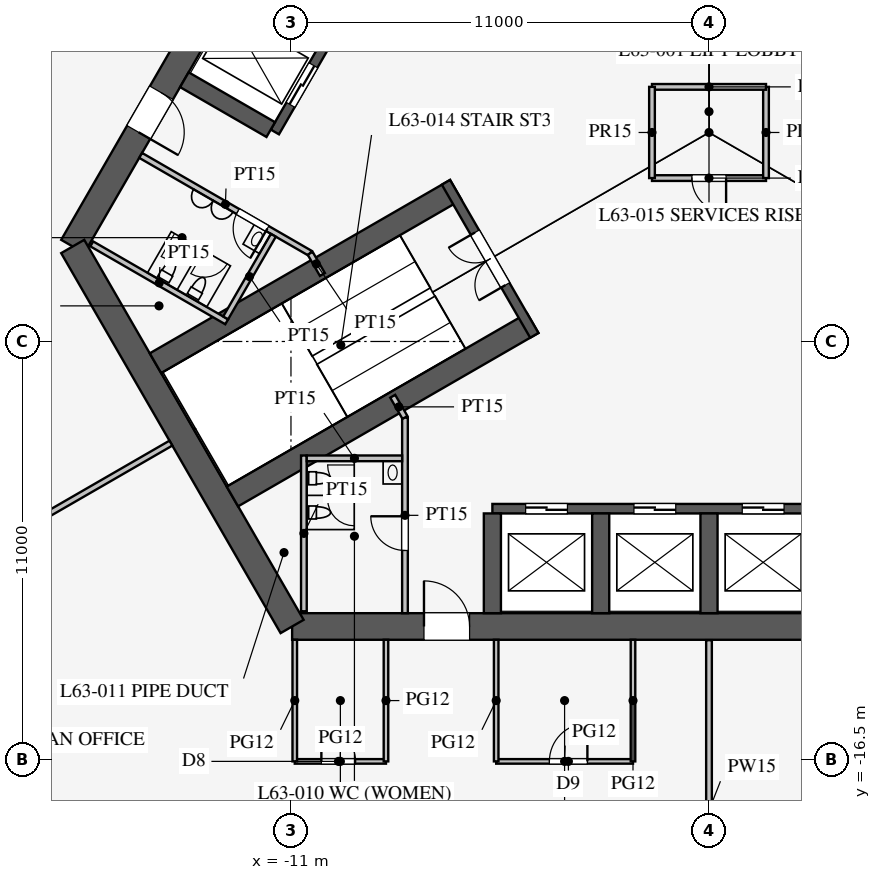
"""IFC4 building model, lengths in metres.
Left out: names, types, materials, properties, quantities, classifications, styles, units other than length and angle.
Written with IfcOpenShell. Run it as: python <this file> out.ifc"""

import sys

from ifc_helpers import new_model, si_unit, direction, frame, frame_2d, origin, place, context, subcontext, project, spatial, rectangle, extrude, element, fill, save


model = new_model("IFC4")
c1 = context("Model", 3, precision=1e-05, world=origin(), true_north=direction((0.0, 1.0)))
c2 = subcontext(c1, "Body", "Model", "MODEL_VIEW")
j1 = project(units=[si_unit("LENGTHUNIT", "METRE"), si_unit("PLANEANGLEUNIT", "RADIAN")], contexts=[c1])
p1 = place(None, origin())
s1 = spatial("IfcSite", under=j1, at=p1, CompositionType="ELEMENT")
p2 = place(p1, origin())
s2 = spatial("IfcBuilding", under=s1, at=p2, CompositionType="ELEMENT")
p3 = place(p2, frame((0.0, 0.0, 276.3)))
s3 = spatial("IfcBuildingStorey", under=s2, at=p3, CompositionType="ELEMENT", Elevation=276.3)
p4 = place(p3, frame((-10.97, -13.0, 0.0), z_axis=(0.0, 0.0, 1.0), x_axis=(1.0, 0.0, 0.0)))
e1 = element("IfcWall", 1, at=p4, inside=s3, PredefinedType="SHEAR", context=c2, shape_type="SweptSolid", body=[
    extrude(rectangle(XDim=21.939, YDim=0.7, at=frame_2d((10.97, 0.0))), origin(), (0.0, 0.0, 1.0), 4.2),
])
p5 = place(p4, frame((17.27, 0.0, 0.0)))
e2 = element("IfcOpeningElement", 2, at=p5, cuts=e1, PredefinedType="OPENING", context=c2, shape_type="SweptSolid", body=[
    extrude(rectangle(XDim=1.2, YDim=2.1, at=frame_2d((0.6, 1.05))), frame((0.0, 0.36, 0.0), z_axis=(0.0, -1.0, 0.0), x_axis=(1.0, 0.0, 0.0)), (0.0, 0.0, 1.0), 0.72),
])
p6 = place(p4, frame((3.47, 0.0, 0.0)))
e3 = element("IfcOpeningElement", 3, at=p6, cuts=e1, PredefinedType="OPENING", context=c2, shape_type="SweptSolid", body=[
    extrude(rectangle(XDim=1.2, YDim=2.1, at=frame_2d((0.6, 1.05))), frame((0.0, 0.36, 0.0), z_axis=(0.0, -1.0, 0.0), x_axis=(1.0, 0.0, 0.0)), (0.0, 0.0, 1.0), 0.72),
])
p7 = place(p3, frame((-5.773, 16.0, 0.0), z_axis=(0.0, 0.0, 1.0), x_axis=(-0.500002442456, -0.866023993627, 0.0)))
e4 = element("IfcWall", 4, at=p7, inside=s3, PredefinedType="SHEAR", context=c2, shape_type="SweptSolid", body=[
    extrude(rectangle(XDim=21.939, YDim=0.7, at=frame_2d((10.97, 0.0))), origin(), (0.0, 0.0, 1.0), 4.2),
])
p8 = place(p7, frame((17.27, 0.0, 0.0)))
e5 = element("IfcOpeningElement", 5, at=p8, cuts=e4, PredefinedType="OPENING", context=c2, shape_type="SweptSolid", body=[
    extrude(rectangle(XDim=1.2, YDim=2.1, at=frame_2d((0.6, 1.05))), frame((0.0, 0.36, 0.0), z_axis=(0.0, -1.0, 0.0), x_axis=(1.0, 0.0, 0.0)), (0.0, 0.0, 1.0), 0.72),
])
p9 = place(p7, frame((3.47, 0.0, 0.0)))
e6 = element("IfcOpeningElement", 6, at=p9, cuts=e4, PredefinedType="OPENING", context=c2, shape_type="SweptSolid", body=[
    extrude(rectangle(XDim=1.2, YDim=2.1, at=frame_2d((0.6, 1.05))), frame((0.0, 0.36, 0.0), z_axis=(0.0, -1.0, 0.0), x_axis=(1.0, 0.0, 0.0)), (0.0, 0.0, 1.0), 0.72),
])
p10 = place(p3, frame((-16.743, -3.0, 0.0), z_axis=(0.0, 0.0, 1.0), x_axis=(0.499995765644, -0.866027848477, 0.0)))
e7 = element("IfcWall", 7, at=p10, inside=s3, PredefinedType="SHEAR", context=c2, shape_type="SweptSolid", body=[
    extrude(rectangle(XDim=11.547, YDim=0.7, at=frame_2d((5.773, 0.0))), origin(), (0.0, 0.0, 1.0), 4.2),
])
p11 = place(p3, frame((-5.7, -9.9, 0.0), z_axis=(0.0, 0.0, 1.0), x_axis=(1.0, 0.0, 0.0)))
e8 = element("IfcWall", 8, at=p11, inside=s3, PredefinedType="SHEAR", context=c2, shape_type="SweptSolid", body=[
    extrude(rectangle(XDim=11.4, YDim=0.25, at=frame_2d((5.7, 0.0))), origin(), (0.0, 0.0, 1.0), 4.2),
])
p12 = place(p11, frame((0.875, 0.0, 0.0)))
e9 = element("IfcOpeningElement", 9, at=p12, cuts=e8, PredefinedType="OPENING", context=c2, shape_type="SweptSolid", body=[
    extrude(rectangle(XDim=1.1, YDim=2.2, at=frame_2d((0.55, 1.1))), frame((0.0, 0.135, 0.0), z_axis=(0.0, -1.0, 0.0), x_axis=(1.0, 0.0, 0.0)), (0.0, 0.0, 1.0), 0.27),
])
p13 = place(p11, frame((3.725, 0.0, 0.0)))
e10 = element("IfcOpeningElement", 10, at=p13, cuts=e8, PredefinedType="OPENING", context=c2, shape_type="SweptSolid", body=[
    extrude(rectangle(XDim=1.1, YDim=2.2, at=frame_2d((0.55, 1.1))), frame((0.0, 0.135, 0.0), z_axis=(0.0, -1.0, 0.0), x_axis=(1.0, 0.0, 0.0)), (0.0, 0.0, 1.0), 0.27),
])
p14 = place(p11, frame((6.575, 0.0, 0.0)))
e11 = element("IfcOpeningElement", 11, at=p14, cuts=e8, PredefinedType="OPENING", context=c2, shape_type="SweptSolid", body=[
    extrude(rectangle(XDim=1.1, YDim=2.2, at=frame_2d((0.55, 1.1))), frame((0.0, 0.135, 0.0), z_axis=(0.0, -1.0, 0.0), x_axis=(1.0, 0.0, 0.0)), (0.0, 0.0, 1.0), 0.27),
])
p15 = place(p11, frame((9.425, 0.0, 0.0)))
e12 = element("IfcOpeningElement", 12, at=p15, cuts=e8, PredefinedType="OPENING", context=c2, shape_type="SweptSolid", body=[
    extrude(rectangle(XDim=1.1, YDim=2.2, at=frame_2d((0.55, 1.1))), frame((0.0, 0.135, 0.0), z_axis=(0.0, -1.0, 0.0), x_axis=(1.0, 0.0, 0.0)), (0.0, 0.0, 1.0), 0.27),
])
for number, where, z_axis, x_axis in (
    (13, (-5.7, -10.025, 0.0), (0.0, 0.0, 1.0), (0.0, -1.0, 0.0)),
    (14, (-2.85, -10.025, 0.0), (0.0, 0.0, 1.0), (0.0, -1.0, 0.0)),
    (15, (0.0, -10.025, 0.0), (0.0, 0.0, 1.0), (0.0, -1.0, 0.0)),
):
    element("IfcWall", number, at=place(p3, frame(where, z_axis=z_axis, x_axis=x_axis)), inside=s3, PredefinedType="SHEAR", context=c2, shape_type="SweptSolid", body=[
        extrude(rectangle(XDim=2.625, YDim=0.45, at=frame_2d((1.312, 0.0))), origin(), (0.0, 0.0, 1.0), 4.2),
    ])
p16 = place(p3, frame((-5.724, 9.886, 0.0), z_axis=(0.0, 0.0, 1.0), x_axis=(-0.500001763848, -0.866024385424, 0.0)))
e16 = element("IfcWall", 16, at=p16, inside=s3, PredefinedType="SHEAR", context=c2, shape_type="SweptSolid", body=[
    extrude(rectangle(XDim=11.4, YDim=0.25, at=frame_2d((5.7, 0.0))), origin(), (0.0, 0.0, 1.0), 4.2),
])
p17 = place(p16, frame((6.525, 0.0, 0.0)))
e17 = element("IfcOpeningElement", 17, at=p17, cuts=e16, PredefinedType="OPENING", context=c2, shape_type="SweptSolid", body=[
    extrude(rectangle(XDim=1.2, YDim=2.2, at=frame_2d((0.6, 1.1))), frame((0.0, 0.135, 0.0), z_axis=(0.0, -1.0, 0.0), x_axis=(1.0, 0.0, 0.0)), (0.0, 0.0, 1.0), 0.27),
])
p18 = place(p16, frame((9.375, 0.0, 0.0)))
e18 = element("IfcOpeningElement", 18, at=p18, cuts=e16, PredefinedType="OPENING", context=c2, shape_type="SweptSolid", body=[
    extrude(rectangle(XDim=1.2, YDim=2.2, at=frame_2d((0.6, 1.1))), frame((0.0, 0.135, 0.0), z_axis=(0.0, -1.0, 0.0), x_axis=(1.0, 0.0, 0.0)), (0.0, 0.0, 1.0), 0.27),
])
p19 = place(p3, frame((-11.532, 0.076, 0.0), z_axis=(0.0, 0.0, 1.0), x_axis=(-0.866013657776, 0.500020344131, 0.0)))
e19 = element("IfcWall", 19, at=p19, inside=s3, PredefinedType="SHEAR", context=c2, shape_type="SweptSolid", body=[
    extrude(rectangle(XDim=2.625, YDim=0.45, at=frame_2d((1.312, 0.0))), origin(), (0.0, 0.0, 1.0), 4.2),
])
for number, where, z_axis, x_axis in (
    (20, (-6.663, -1.509, 0.0), (0.0, 0.0, 1.0), (-0.866, -0.5, 0.0)),
    (21, (-4.638, -5.016, 0.0), (0.0, 0.0, 1.0), (-0.866, -0.5, 0.0)),
):
    element("IfcWall", number, at=place(p3, frame(where, z_axis=z_axis, x_axis=x_axis)), inside=s3, PredefinedType="SHEAR", context=c2, shape_type="SweptSolid", body=[
        extrude(rectangle(XDim=9.125, YDim=0.6, at=frame_2d((4.562, 0.0))), origin(), (0.0, 0.0, 1.0), 4.2),
    ])
p20 = place(p3, frame((-6.922, -1.312, 0.0), z_axis=(0.0, 0.0, 1.0), x_axis=(0.499984536904, -0.866034331223, 0.0)))
e22 = element("IfcWall", 22, at=p20, inside=s3, PredefinedType="SHEAR", context=c2, shape_type="SweptSolid", body=[
    extrude(rectangle(XDim=4.65, YDim=0.25, at=frame_2d((2.325, 0.0))), origin(), (0.0, 0.0, 1.0), 4.2),
])
p21 = place(p20, frame((1.525, 0.0, 0.0)))
e23 = element("IfcOpeningElement", 23, at=p21, cuts=e22, PredefinedType="OPENING", context=c2, shape_type="SweptSolid", body=[
    extrude(rectangle(XDim=1.6, YDim=2.1, at=frame_2d((0.8, 1.05))), frame((0.0, 0.135, 0.0), z_axis=(0.0, -1.0, 0.0), x_axis=(1.0, 0.0, 0.0)), (0.0, 0.0, 1.0), 0.27),
])
p22 = place(p3, frame((-8.0, -7.5, 0.0), z_axis=(0.0, 0.0, 1.0), x_axis=(0.0, -1.0, 0.0)))
e24 = element("IfcWall", 24, at=p22, inside=s3, PredefinedType="PARTITIONING", context=c2, shape_type="SweptSolid", body=[
    extrude(rectangle(XDim=5.15, YDim=0.15, at=frame_2d((2.575, 0.0))), origin(), (0.0, 0.0, 1.0), 4.0),
])
p23 = place(p22, frame((2.6, 0.0, 0.0)))
e25 = element("IfcOpeningElement", 25, at=p23, cuts=e24, PredefinedType="OPENING", context=c2, shape_type="SweptSolid", body=[
    extrude(rectangle(XDim=0.9, YDim=2.1, at=frame_2d((0.45, 1.05))), frame((0.0, 0.085, 0.0), z_axis=(0.0, -1.0, 0.0), x_axis=(1.0, 0.0, 0.0)), (0.0, 0.0, 1.0), 0.17),
])
p24 = place(p3, frame((-10.495, -3.178, 0.0), z_axis=(0.0, 0.0, 1.0), x_axis=(-0.866037967349, 0.499978238636, 0.0)))
e26 = element("IfcWall", 26, at=p24, inside=s3, PredefinedType="PARTITIONING", context=c2, shape_type="SweptSolid", body=[
    extrude(rectangle(XDim=5.15, YDim=0.15, at=frame_2d((2.575, 0.0))), origin(), (0.0, 0.0, 1.0), 4.0),
])
p25 = place(p24, frame((1.3, 0.0, 0.0)))
e27 = element("IfcOpeningElement", 27, at=p25, cuts=e26, PredefinedType="OPENING", context=c2, shape_type="SweptSolid", body=[
    extrude(rectangle(XDim=0.9, YDim=2.1, at=frame_2d((0.45, 1.05))), frame((0.0, 0.085, 0.0), z_axis=(0.0, -1.0, 0.0), x_axis=(1.0, 0.0, 0.0)), (0.0, 0.0, 1.0), 0.17),
])
for number, where, z_axis, x_axis in (
    (28, (-10.495, -3.178, 0.0), (0.0, 0.0, 1.0), (0.5, -0.866, 0.0)),
    (29, (-8.0, -7.5, 0.0), (0.0, 0.0, 1.0), (-0.5, 0.866, 0.0)),
):
    element("IfcWall", number, at=place(p3, frame(where, z_axis=z_axis, x_axis=x_axis)), inside=s3, PredefinedType="PARTITIONING", context=c2, shape_type="SweptSolid", body=[
        extrude(rectangle(XDim=0.645, YDim=0.15, at=frame_2d((0.323, 0.0))), origin(), (0.0, 0.0, 1.0), 4.0),
    ])
p26 = place(p3, frame((-12.691, -4.982, 0.0), z_axis=(0.0, 0.0, 1.0), x_axis=(-0.8660249478, 0.500000789788, 0.0)))
e30 = element("IfcWall", 30, at=p26, inside=s3, PredefinedType="PARTITIONING", context=c2, shape_type="SweptSolid", body=[
    extrude(rectangle(XDim=4.1, YDim=0.15, at=frame_2d((2.05, 0.0))), origin(), (0.0, 0.0, 1.0), 4.0),
])
p27 = place(p3, frame((-11.464, -2.706, 0.0), z_axis=(0.0, 0.0, 1.0), x_axis=(-0.50001992892, -0.866013897511, 0.0)))
e31 = element("IfcWall", 31, at=p27, inside=s3, PredefinedType="PARTITIONING", context=c2, shape_type="SweptSolid", body=[
    extrude(rectangle(XDim=2.51, YDim=0.15, at=frame_2d((1.255, 0.0))), origin(), (0.0, 0.0, 1.0), 4.0),
])
p28 = place(p3, frame((-10.66, -8.5, 0.0), z_axis=(0.0, 0.0, 1.0), x_axis=(0.0, -1.0, 0.0)))
e32 = element("IfcWall", 32, at=p28, inside=s3, PredefinedType="PARTITIONING", context=c2, shape_type="SweptSolid", body=[
    extrude(rectangle(XDim=4.1, YDim=0.15, at=frame_2d((2.05, 0.0))), origin(), (0.0, 0.0, 1.0), 4.0),
])
p29 = place(p3, frame((-8.075, -8.575, 0.0), z_axis=(0.0, 0.0, 1.0), x_axis=(-1.0, 0.0, 0.0)))
e33 = element("IfcWall", 33, at=p29, inside=s3, PredefinedType="PARTITIONING", context=c2, shape_type="SweptSolid", body=[
    extrude(rectangle(XDim=2.51, YDim=0.15, at=frame_2d((1.255, 0.0))), origin(), (0.0, 0.0, 1.0), 4.0),
])
p30 = place(p3, frame((-1.5, -1.2, 0.0), z_axis=(0.0, 0.0, 1.0), x_axis=(1.0, 0.0, 0.0)))
e34 = element("IfcWall", 34, at=p30, inside=s3, PredefinedType="PARTITIONING", context=c2, shape_type="SweptSolid", body=[
    extrude(rectangle(XDim=3.0, YDim=0.15, at=frame_2d((1.5, 0.0))), origin(), (0.0, 0.0, 1.0), 4.0),
])
p31 = place(p30, frame((1.05, 0.0, 0.0)))
e35 = element("IfcOpeningElement", 35, at=p31, cuts=e34, PredefinedType="OPENING", context=c2, shape_type="SweptSolid", body=[
    extrude(rectangle(XDim=0.9, YDim=2.1, at=frame_2d((0.45, 1.05))), frame((0.0, 0.085, 0.0), z_axis=(0.0, -1.0, 0.0), x_axis=(1.0, 0.0, 0.0)), (0.0, 0.0, 1.0), 0.17),
])
p32 = place(p3, frame((1.5, -1.2, 0.0), z_axis=(0.0, 0.0, 1.0), x_axis=(0.0, 1.0, 0.0)))
e36 = element("IfcWall", 36, at=p32, inside=s3, PredefinedType="PARTITIONING", context=c2, shape_type="SweptSolid", body=[
    extrude(rectangle(XDim=2.4, YDim=0.15, at=frame_2d((1.2, 0.0))), origin(), (0.0, 0.0, 1.0), 4.0),
])
p33 = place(p3, frame((1.5, 1.2, 0.0), z_axis=(0.0, 0.0, 1.0), x_axis=(-1.0, 0.0, 0.0)))
e37 = element("IfcWall", 37, at=p33, inside=s3, PredefinedType="PARTITIONING", context=c2, shape_type="SweptSolid", body=[
    extrude(rectangle(XDim=3.0, YDim=0.15, at=frame_2d((1.5, 0.0))), origin(), (0.0, 0.0, 1.0), 4.0),
])
p34 = place(p3, frame((-1.5, 1.2, 0.0), z_axis=(0.0, 0.0, 1.0), x_axis=(0.0, -1.0, 0.0)))
e38 = element("IfcWall", 38, at=p34, inside=s3, PredefinedType="PARTITIONING", context=c2, shape_type="SweptSolid", body=[
    extrude(rectangle(XDim=2.4, YDim=0.15, at=frame_2d((1.2, 0.0))), origin(), (0.0, 0.0, 1.0), 4.0),
])
p35 = place(p3, frame((-14.159, -8.175, 0.0), z_axis=(0.0, 0.0, 1.0), x_axis=(-0.866026905467, -0.499997399001, 0.0)))
e39 = element("IfcWall", 39, at=p35, inside=s3, PredefinedType="PARTITIONING", context=c2, shape_type="SweptSolid", body=[
    extrude(rectangle(XDim=13.4, YDim=0.15, at=frame_2d((6.7, 0.0))), origin(), (0.0, 0.0, 1.0), 2.5),
])
p36 = place(p3, frame((0.0, -13.36, 0.0), z_axis=(0.0, 0.0, 1.0), x_axis=(0.0, -1.0, 0.0)))
e40 = element("IfcWall", 40, at=p36, inside=s3, PredefinedType="PARTITIONING", context=c2, shape_type="SweptSolid", body=[
    extrude(rectangle(XDim=8.961, YDim=0.15, at=frame_2d((4.481, 0.0))), origin(), (0.0, 0.0, 1.0), 2.6),
])
p37 = place(p3, frame((-10.9, -16.55, 0.0), z_axis=(0.0, 0.0, 1.0), x_axis=(1.0, 0.0, 0.0)))
e41 = element("IfcWall", 41, at=p37, inside=s3, PredefinedType="PARTITIONING", context=c2, shape_type="SweptSolid", body=[
    extrude(rectangle(XDim=2.4, YDim=0.12, at=frame_2d((1.2, 0.0))), origin(), (0.0, 0.0, 1.0), 2.9),
])
p38 = place(p37, frame((0.7, 0.0, 0.15)))
e42 = element("IfcOpeningElement", 42, at=p38, cuts=e41, PredefinedType="OPENING", context=c2, shape_type="SweptSolid", body=[
    extrude(rectangle(XDim=0.9, YDim=2.1, at=frame_2d((0.45, 1.05))), frame((0.0, 0.07, 0.0), z_axis=(0.0, -1.0, 0.0), x_axis=(1.0, 0.0, 0.0)), (0.0, 0.0, 1.0), 0.14),
])
p39 = place(p3, frame((-5.6, -16.55, 0.0), z_axis=(0.0, 0.0, 1.0), x_axis=(1.0, 0.0, 0.0)))
e43 = element("IfcWall", 43, at=p39, inside=s3, PredefinedType="PARTITIONING", context=c2, shape_type="SweptSolid", body=[
    extrude(rectangle(XDim=3.6, YDim=0.12, at=frame_2d((1.8, 0.0))), origin(), (0.0, 0.0, 1.0), 2.9),
])
p40 = place(p39, frame((1.4, 0.0, 0.15)))
e44 = element("IfcOpeningElement", 44, at=p40, cuts=e43, PredefinedType="OPENING", context=c2, shape_type="SweptSolid", body=[
    extrude(rectangle(XDim=1.0, YDim=2.1, at=frame_2d((0.5, 1.05))), frame((0.0, 0.07, 0.0), z_axis=(0.0, -1.0, 0.0), x_axis=(1.0, 0.0, 0.0)), (0.0, 0.0, 1.0), 0.14),
])
for number, where, z_axis, x_axis in (
    (45, (-10.9, -13.35, 0.0), (0.0, 0.0, 1.0), (0.0, -1.0, 0.0)),
    (46, (-2.0, -13.35, 0.0), (0.0, 0.0, 1.0), (0.0, -1.0, 0.0)),
    (47, (-5.6, -13.35, 0.0), (0.0, 0.0, 1.0), (0.0, -1.0, 0.0)),
    (48, (-8.5, -13.35, 0.0), (0.0, 0.0, 1.0), (0.0, -1.0, 0.0)),
):
    element("IfcWall", number, at=place(p3, frame(where, z_axis=z_axis, x_axis=x_axis)), inside=s3, PredefinedType="PARTITIONING", context=c2, shape_type="SweptSolid", body=[
        extrude(rectangle(XDim=3.2, YDim=0.12, at=frame_2d((1.6, 0.0))), origin(), (0.0, 0.0, 1.0), 2.9),
    ])
p41 = place(p3, frame((25.854, -14.361, 0.0), z_axis=(0.0, 0.0, 1.0), x_axis=(-0.499999496503, 0.866025694478, 0.0)))
e49 = element("IfcWall", 49, at=p41, inside=s3, PredefinedType="PARTITIONING", context=c2, shape_type="SweptSolid", body=[
    extrude(rectangle(XDim=50.728, YDim=0.12, at=frame_2d((25.364, 0.0))), origin(), (0.0, 0.0, 1.0), 2.9),
])
p42 = place(p41, frame((9.75, 0.0, 0.15)))
e50 = element("IfcOpeningElement", 50, at=p42, cuts=e49, PredefinedType="OPENING", context=c2, shape_type="SweptSolid", body=[
    extrude(rectangle(XDim=1.8, YDim=2.1, at=frame_2d((0.9, 1.05))), frame((0.0, 0.07, 0.0), z_axis=(0.0, -1.0, 0.0), x_axis=(1.0, 0.0, 0.0)), (0.0, 0.0, 1.0), 0.14),
])
p43 = place(p41, frame((39.2, 0.0, 0.15)))
e51 = element("IfcOpeningElement", 51, at=p43, cuts=e49, PredefinedType="OPENING", context=c2, shape_type="SweptSolid", body=[
    extrude(rectangle(XDim=1.8, YDim=2.1, at=frame_2d((0.9, 1.05))), frame((0.0, 0.07, 0.0), z_axis=(0.0, -1.0, 0.0), x_axis=(1.0, 0.0, 0.0)), (0.0, 0.0, 1.0), 0.14),
])
p44 = place(p23, frame((0.9, 0.0, 0.0), z_axis=(0.0, 0.0, 1.0), x_axis=(-1.0, 0.0, 0.0)))
e52 = element("IfcDoor", 52, at=p44, inside=s3, OperationType="SINGLE_SWING_RIGHT", PredefinedType="DOOR", context=c2, shape_type="SweptSolid", body=[
    extrude(rectangle(XDim=0.9, YDim=2.1, at=frame_2d((0.45, 1.05))), frame((0.0, 0.025, 0.0), z_axis=(0.0, -1.0, 0.0), x_axis=(1.0, 0.0, 0.0)), (0.0, 0.0, 1.0), 0.05),
])
fill(e25, e52)
p45 = place(p25, origin())
e53 = element("IfcDoor", 53, at=p45, inside=s3, OperationType="SINGLE_SWING_LEFT", PredefinedType="DOOR", context=c2, shape_type="SweptSolid", body=[
    extrude(rectangle(XDim=0.9, YDim=2.1, at=frame_2d((0.45, 1.05))), frame((0.0, 0.025, 0.0), z_axis=(0.0, -1.0, 0.0), x_axis=(1.0, 0.0, 0.0)), (0.0, 0.0, 1.0), 0.05),
])
fill(e27, e53)
p46 = place(p31, frame((0.9, 0.0, 0.0), z_axis=(0.0, 0.0, 1.0), x_axis=(-1.0, 0.0, 0.0)))
e54 = element("IfcDoor", 54, at=p46, inside=s3, OperationType="SINGLE_SWING_LEFT", PredefinedType="DOOR", context=c2, shape_type="SweptSolid", body=[
    extrude(rectangle(XDim=0.9, YDim=2.1, at=frame_2d((0.45, 1.05))), frame((0.0, 0.025, 0.0), z_axis=(0.0, -1.0, 0.0), x_axis=(1.0, 0.0, 0.0)), (0.0, 0.0, 1.0), 0.05),
])
fill(e35, e54)
p47 = place(p21, frame((1.6, 0.0, 0.0), z_axis=(0.0, 0.0, 1.0), x_axis=(-1.0, 0.0, 0.0)))
e55 = element("IfcDoor", 55, at=p47, inside=s3, OperationType="DOUBLE_DOOR_SINGLE_SWING", PredefinedType="DOOR", context=c2, shape_type="SweptSolid", body=[
    extrude(rectangle(XDim=1.6, YDim=2.1, at=frame_2d((0.8, 1.05))), frame((0.0, 0.025, 0.0), z_axis=(0.0, -1.0, 0.0), x_axis=(1.0, 0.0, 0.0)), (0.0, 0.0, 1.0), 0.05),
])
fill(e23, e55)
p48 = place(p6, origin())
e56 = element("IfcDoor", 56, at=p48, inside=s3, OperationType="SINGLE_SWING_LEFT", PredefinedType="DOOR", context=c2, shape_type="SweptSolid", body=[
    extrude(rectangle(XDim=1.2, YDim=2.1, at=frame_2d((0.6, 1.05))), frame((0.0, 0.025, 0.0), z_axis=(0.0, -1.0, 0.0), x_axis=(1.0, 0.0, 0.0)), (0.0, 0.0, 1.0), 0.05),
])
fill(e3, e56)
p49 = place(p8, origin())
e57 = element("IfcDoor", 57, at=p49, inside=s3, OperationType="SINGLE_SWING_RIGHT", PredefinedType="DOOR", context=c2, shape_type="SweptSolid", body=[
    extrude(rectangle(XDim=1.2, YDim=2.1, at=frame_2d((0.6, 1.05))), frame((0.0, 0.025, 0.0), z_axis=(0.0, -1.0, 0.0), x_axis=(1.0, 0.0, 0.0)), (0.0, 0.0, 1.0), 0.05),
])
fill(e5, e57)
p50 = place(p40, origin())
e58 = element("IfcDoor", 58, at=p50, inside=s3, OperationType="SINGLE_SWING_RIGHT", PredefinedType="DOOR", context=c2, shape_type="SweptSolid", body=[
    extrude(rectangle(XDim=1.0, YDim=2.1, at=frame_2d((0.5, 1.05))), frame((0.0, 0.025, 0.0), z_axis=(0.0, -1.0, 0.0), x_axis=(1.0, 0.0, 0.0)), (0.0, 0.0, 1.0), 0.05),
])
fill(e44, e58)
p51 = place(p38, origin())
e59 = element("IfcDoor", 59, at=p51, inside=s3, OperationType="SINGLE_SWING_LEFT", PredefinedType="DOOR", context=c2, shape_type="SweptSolid", body=[
    extrude(rectangle(XDim=0.9, YDim=2.1, at=frame_2d((0.45, 1.05))), frame((0.0, 0.025, 0.0), z_axis=(0.0, -1.0, 0.0), x_axis=(1.0, 0.0, 0.0)), (0.0, 0.0, 1.0), 0.05),
])
fill(e42, e59)
p52 = place(p12, origin())
e60 = element("IfcDoor", 60, at=p52, inside=s3, OperationType="DOUBLE_DOOR_SLIDING", PredefinedType="DOOR", context=c2, shape_type="SweptSolid", body=[
    extrude(rectangle(XDim=1.1, YDim=2.2, at=frame_2d((0.55, 1.1))), frame((0.0, 0.025, 0.0), z_axis=(0.0, -1.0, 0.0), x_axis=(1.0, 0.0, 0.0)), (0.0, 0.0, 1.0), 0.05),
])
fill(e9, e60)
p53 = place(p13, origin())
e61 = element("IfcDoor", 61, at=p53, inside=s3, OperationType="DOUBLE_DOOR_SLIDING", PredefinedType="DOOR", context=c2, shape_type="SweptSolid", body=[
    extrude(rectangle(XDim=1.1, YDim=2.2, at=frame_2d((0.55, 1.1))), frame((0.0, 0.025, 0.0), z_axis=(0.0, -1.0, 0.0), x_axis=(1.0, 0.0, 0.0)), (0.0, 0.0, 1.0), 0.05),
])
fill(e10, e61)
p54 = place(p14, origin())
e62 = element("IfcDoor", 62, at=p54, inside=s3, OperationType="DOUBLE_DOOR_SLIDING", PredefinedType="DOOR", context=c2, shape_type="SweptSolid", body=[
    extrude(rectangle(XDim=1.1, YDim=2.2, at=frame_2d((0.55, 1.1))), frame((0.0, 0.025, 0.0), z_axis=(0.0, -1.0, 0.0), x_axis=(1.0, 0.0, 0.0)), (0.0, 0.0, 1.0), 0.05),
])
fill(e11, e62)
p55 = place(p18, origin())
e63 = element("IfcDoor", 63, at=p55, inside=s3, OperationType="DOUBLE_DOOR_SLIDING", PredefinedType="DOOR", context=c2, shape_type="SweptSolid", body=[
    extrude(rectangle(XDim=1.2, YDim=2.2, at=frame_2d((0.6, 1.1))), frame((0.0, 0.025, 0.0), z_axis=(0.0, -1.0, 0.0), x_axis=(1.0, 0.0, 0.0)), (0.0, 0.0, 1.0), 0.05),
])
fill(e18, e63)
save(model, sys.argv[1])
